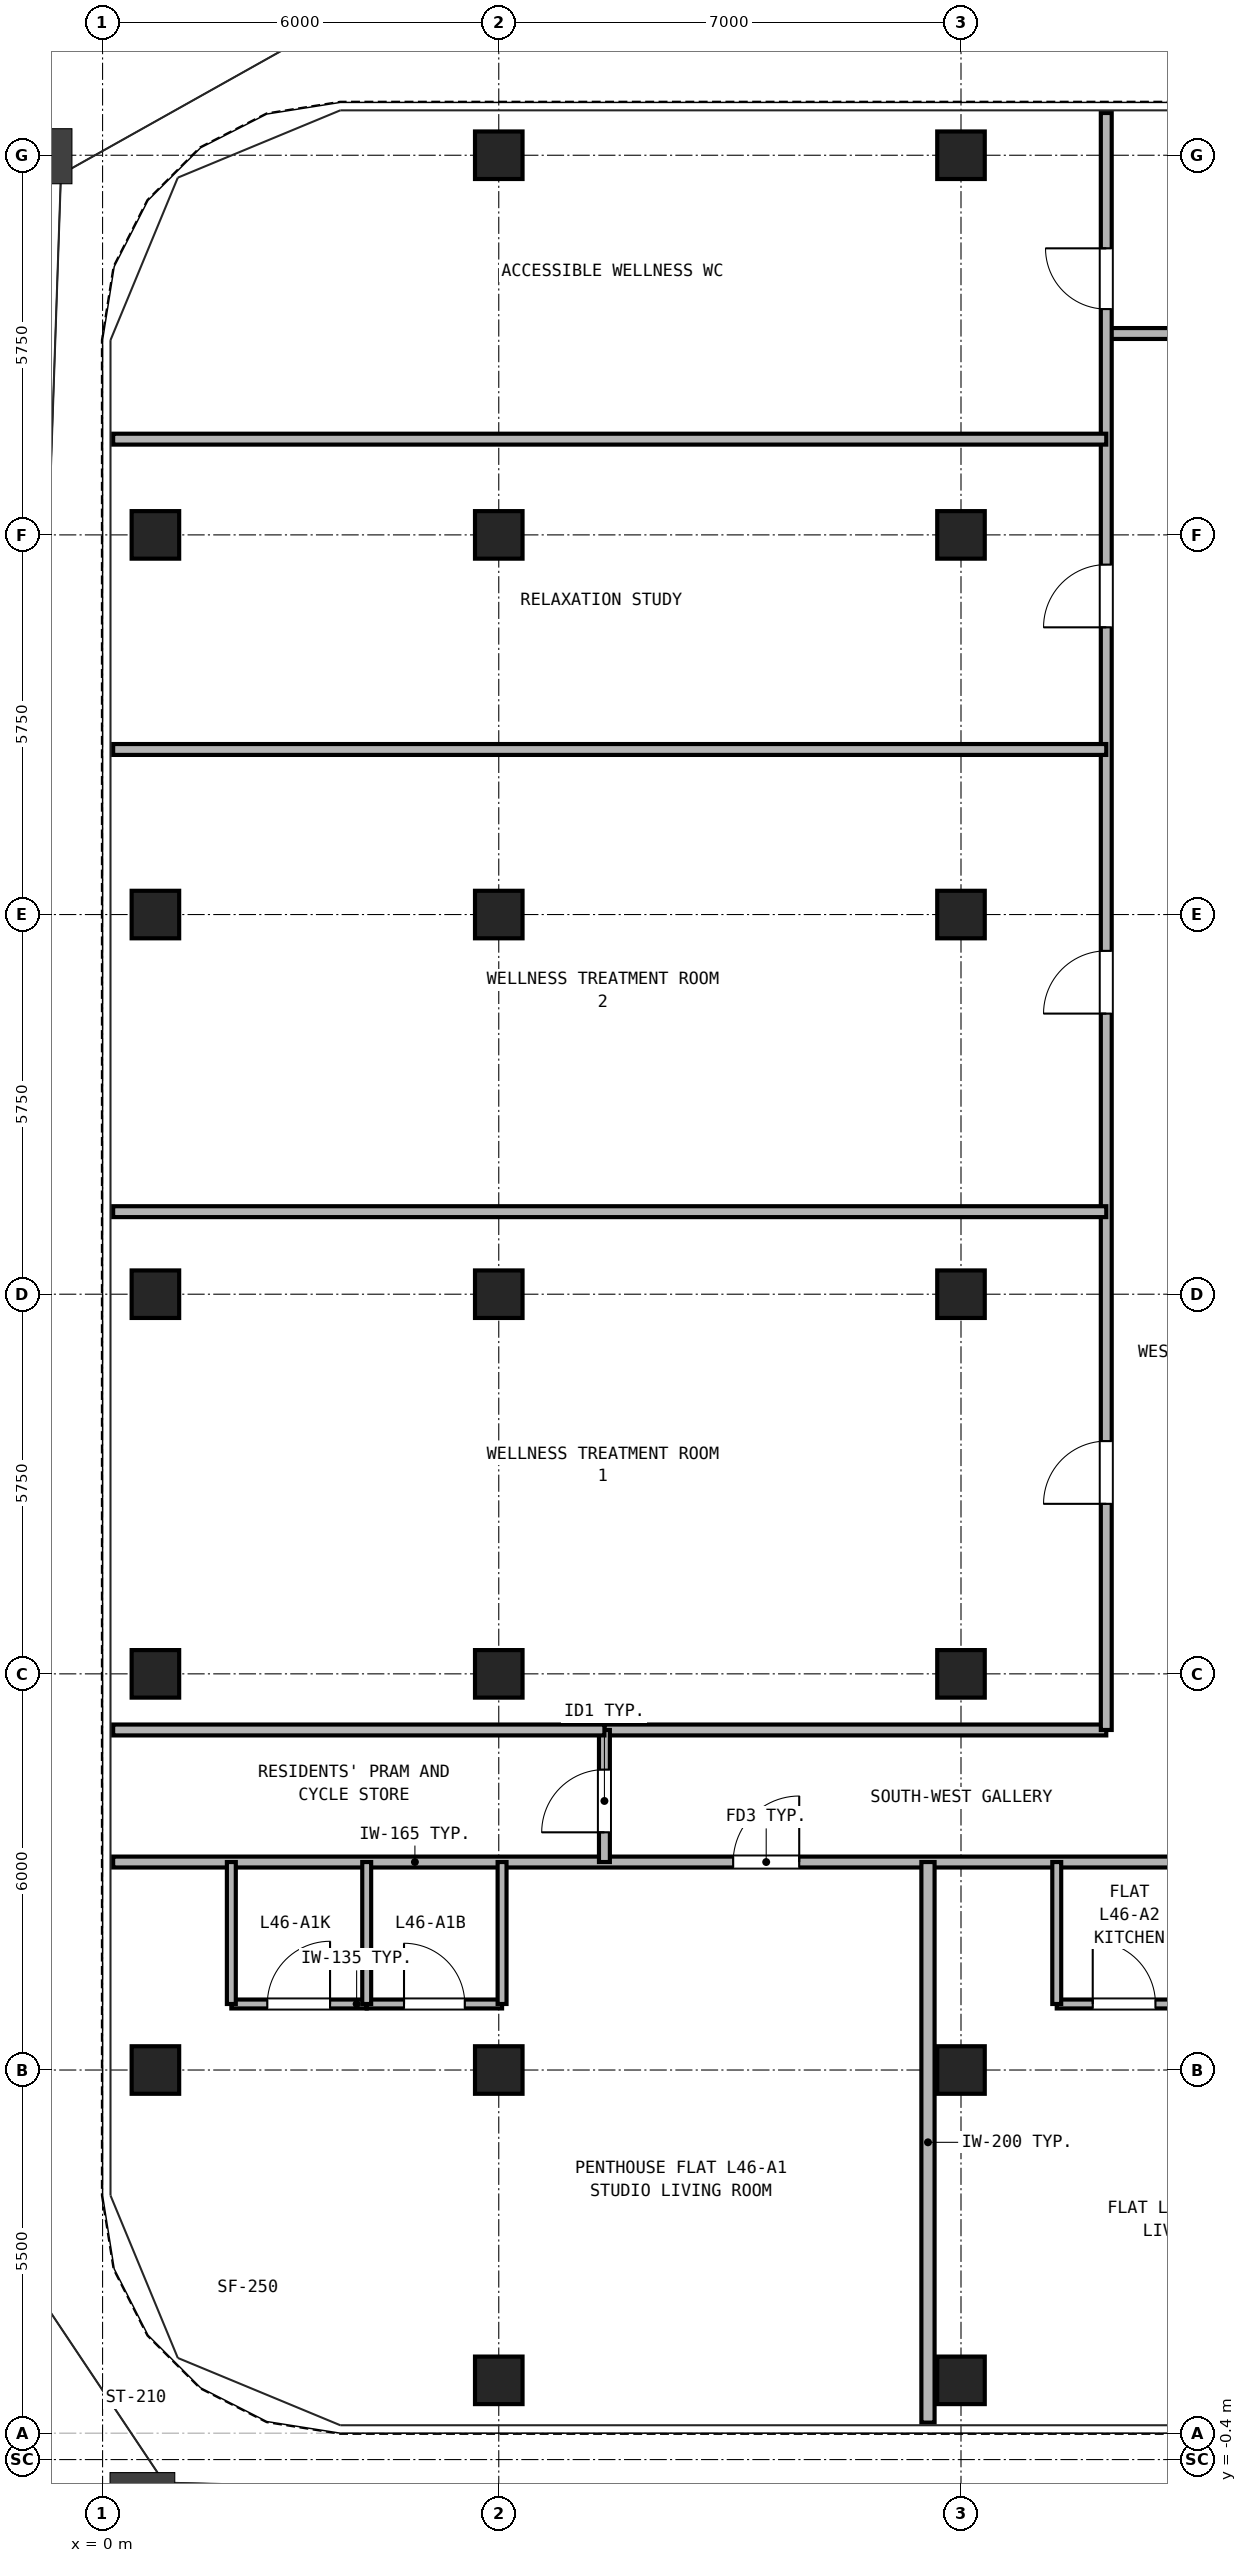
"""IFC4 building model, lengths in metres.
Left out: names, types, materials, properties, quantities, classifications, styles, units other than length and angle.
Written with IfcOpenShell. Run it as: python <this file> out.ifc"""

import sys

from ifc_helpers import new_model, si_unit, direction, frame, frame_2d, origin, origin_2d, place, context, subcontext, project, spatial, rectangle, hollow_rectangle, extrude, source, transform, mapped, element, fill, save


model = new_model("IFC4")
c1 = context("Model", 3, precision=1e-05, world=origin(), true_north=direction((0.0, 1.0)))
c2 = subcontext(c1, "Body", "Model", "MODEL_VIEW")
j1 = project(units=[si_unit("LENGTHUNIT", "METRE"), si_unit("PLANEANGLEUNIT", "RADIAN")], contexts=[c1])
p1 = place(None, origin())
s1 = spatial("IfcSite", under=j1, at=p1, CompositionType="ELEMENT")
p2 = place(p1, origin())
s2 = spatial("IfcBuilding", under=s1, at=p2, CompositionType="ELEMENT")
p3 = place(p2, frame((0.0, 0.0, 165.7)))
s3 = spatial("IfcBuildingStorey", under=s2, at=p3, CompositionType="ELEMENT", Elevation=165.7)
m1 = source(origin(), c2, "Body", "SweptSolid", [
    extrude(hollow_rectangle(XDim=0.72, YDim=0.72, WallThickness=0.04, at=origin_2d()), origin(), (0.0, 0.0, 1.0), 2.95),
])
for number, where, z_axis, x_axis in (
    (1, (6.0, 0.8, 0.0), (0.0, 0.0, 1.0), (1.0, 0.0, 0.0)),
    (2, (6.0, 34.5, 0.0), (0.0, 0.0, 1.0), (1.0, 0.0, 0.0)),
    (3, (13.0, 0.8, 0.0), (0.0, 0.0, 1.0), (1.0, 0.0, 0.0)),
    (4, (13.0, 34.5, 0.0), (0.0, 0.0, 1.0), (1.0, 0.0, 0.0)),
    (5, (0.8, 5.5, 0.0), (0.0, 0.0, 1.0), (1.0, 0.0, 0.0)),
    (6, (0.8, 11.5, 0.0), (0.0, 0.0, 1.0), (1.0, 0.0, 0.0)),
    (7, (0.8, 17.25, 0.0), (0.0, 0.0, 1.0), (1.0, 0.0, 0.0)),
    (8, (0.8, 23.0, 0.0), (0.0, 0.0, 1.0), (1.0, 0.0, 0.0)),
    (9, (0.8, 28.75, 0.0), (0.0, 0.0, 1.0), (1.0, 0.0, 0.0)),
    (10, (6.0, 5.5, 0.0), (0.0, 0.0, 1.0), (1.0, 0.0, 0.0)),
    (11, (6.0, 11.5, 0.0), (0.0, 0.0, 1.0), (1.0, 0.0, 0.0)),
    (12, (6.0, 17.25, 0.0), (0.0, 0.0, 1.0), (1.0, 0.0, 0.0)),
    (13, (6.0, 23.0, 0.0), (0.0, 0.0, 1.0), (1.0, 0.0, 0.0)),
    (14, (6.0, 28.75, 0.0), (0.0, 0.0, 1.0), (1.0, 0.0, 0.0)),
    (15, (13.0, 5.5, 0.0), (0.0, 0.0, 1.0), (1.0, 0.0, 0.0)),
    (16, (13.0, 11.5, 0.0), (0.0, 0.0, 1.0), (1.0, 0.0, 0.0)),
    (17, (13.0, 17.25, 0.0), (0.0, 0.0, 1.0), (1.0, 0.0, 0.0)),
    (18, (13.0, 23.0, 0.0), (0.0, 0.0, 1.0), (1.0, 0.0, 0.0)),
    (19, (13.0, 28.75, 0.0), (0.0, 0.0, 1.0), (1.0, 0.0, 0.0)),
):
    element("IfcColumn", number, at=place(p3, frame(where, z_axis=z_axis, x_axis=x_axis)), inside=s3, PredefinedType="COLUMN", context=c2, shape_type="MappedRepresentation", body=[
        mapped(m1, transform((0.0, 0.0, 0.0), x_axis=(1.0, 0.0, 0.0), y_axis=(0.0, 1.0, 0.0), z_axis=(0.0, 0.0, 1.0), scale=1.0)),
    ])
p4 = place(p3, frame((0.16, 8.65, 0.0), z_axis=(0.0, 0.0, 1.0), x_axis=(1.0, 0.0, 0.0)))
e20 = element("IfcWall", 20, at=p4, inside=s3, PredefinedType="PARTITIONING", context=c2, shape_type="SweptSolid", body=[
    extrude(rectangle(XDim=41.48, YDim=0.165, at=frame_2d((20.74, 0.0))), origin(), (0.0, 0.0, 1.0), 2.583),
])
p5 = place(p4, frame((9.39, 0.0, 0.0)))
e21 = element("IfcOpeningElement", 21, at=p5, cuts=e20, PredefinedType="OPENING", context=c2, shape_type="SweptSolid", body=[
    extrude(rectangle(XDim=1.0, YDim=2.15, at=frame_2d((0.5, 1.075))), frame((0.0, 0.093, 0.0), z_axis=(0.0, -1.0, 0.0), x_axis=(1.0, 0.0, 0.0)), (0.0, 0.0, 1.0), 0.185),
])
p6 = place(p4, frame((18.965, 0.0, 0.0)))
e22 = element("IfcOpeningElement", 22, at=p6, cuts=e20, PredefinedType="OPENING", context=c2, shape_type="SweptSolid", body=[
    extrude(rectangle(XDim=1.0, YDim=2.15, at=frame_2d((0.5, 1.075))), frame((0.0, 0.093, 0.0), z_axis=(0.0, -1.0, 0.0), x_axis=(1.0, 0.0, 0.0)), (0.0, 0.0, 1.0), 0.185),
])
p7 = place(p4, frame((26.34, 0.0, 0.0)))
e23 = element("IfcOpeningElement", 23, at=p7, cuts=e20, PredefinedType="OPENING", context=c2, shape_type="SweptSolid", body=[
    extrude(rectangle(XDim=1.0, YDim=2.15, at=frame_2d((0.5, 1.075))), frame((0.0, 0.093, 0.0), z_axis=(0.0, -1.0, 0.0), x_axis=(1.0, 0.0, 0.0)), (0.0, 0.0, 1.0), 0.185),
])
p8 = place(p4, frame((31.715, 0.0, 0.0)))
e24 = element("IfcOpeningElement", 24, at=p8, cuts=e20, PredefinedType="OPENING", context=c2, shape_type="SweptSolid", body=[
    extrude(rectangle(XDim=1.0, YDim=2.15, at=frame_2d((0.5, 1.075))), frame((0.0, 0.093, 0.0), z_axis=(0.0, -1.0, 0.0), x_axis=(1.0, 0.0, 0.0)), (0.0, 0.0, 1.0), 0.185),
])
p9 = place(p3, frame((7.6, 10.65, 0.0), z_axis=(0.0, 0.0, 1.0), x_axis=(1.0, 0.0, 0.0)))
e25 = element("IfcWall", 25, at=p9, inside=s3, PredefinedType="PARTITIONING", context=c2, shape_type="SweptSolid", body=[
    extrude(rectangle(XDim=7.6, YDim=0.165, at=frame_2d((3.8, 0.0))), origin(), (0.0, 0.0, 1.0), 2.95),
])
p10 = place(p3, frame((7.6, 8.65, 0.0), z_axis=(0.0, 0.0, 1.0), x_axis=(0.0, 1.0, 0.0)))
e26 = element("IfcWall", 26, at=p10, inside=s3, PredefinedType="PARTITIONING", context=c2, shape_type="SweptSolid", body=[
    extrude(rectangle(XDim=2.0, YDim=0.165, at=frame_2d((1.0, 0.0))), origin(), (0.0, 0.0, 1.0), 2.95),
])
p11 = place(p10, frame((0.45, 0.0, 0.0)))
e27 = element("IfcOpeningElement", 27, at=p11, cuts=e26, PredefinedType="OPENING", context=c2, shape_type="SweptSolid", body=[
    extrude(rectangle(XDim=0.95, YDim=2.15, at=frame_2d((0.475, 1.075))), frame((0.0, 0.093, 0.0), z_axis=(0.0, -1.0, 0.0), x_axis=(1.0, 0.0, 0.0)), (0.0, 0.0, 1.0), 0.185),
])
p12 = place(p3, frame((15.2, 31.8, 0.0), z_axis=(0.0, 0.0, 1.0), x_axis=(1.0, 0.0, 0.0)))
e28 = element("IfcWall", 28, at=p12, inside=s3, PredefinedType="PARTITIONING", context=c2, shape_type="SweptSolid", body=[
    extrude(rectangle(XDim=16.6, YDim=0.165, at=frame_2d((8.3, 0.0))), origin(), (0.0, 0.0, 1.0), 2.583),
])
p13 = place(p12, frame((3.65, 0.0, 0.0)))
e29 = element("IfcOpeningElement", 29, at=p13, cuts=e28, PredefinedType="OPENING", context=c2, shape_type="SweptSolid", body=[
    extrude(rectangle(XDim=0.95, YDim=2.15, at=frame_2d((0.475, 1.075))), frame((0.0, 0.093, 0.0), z_axis=(0.0, -1.0, 0.0), x_axis=(1.0, 0.0, 0.0)), (0.0, 0.0, 1.0), 0.185),
])
p14 = place(p12, frame((9.1, 0.0, 0.0)))
e30 = element("IfcOpeningElement", 30, at=p14, cuts=e28, PredefinedType="OPENING", context=c2, shape_type="SweptSolid", body=[
    extrude(rectangle(XDim=0.95, YDim=2.15, at=frame_2d((0.475, 1.075))), frame((0.0, 0.093, 0.0), z_axis=(0.0, -1.0, 0.0), x_axis=(1.0, 0.0, 0.0)), (0.0, 0.0, 1.0), 0.185),
])
p15 = place(p12, frame((13.25, 0.0, 0.0)))
e31 = element("IfcOpeningElement", 31, at=p15, cuts=e28, PredefinedType="OPENING", context=c2, shape_type="SweptSolid", body=[
    extrude(rectangle(XDim=0.92, YDim=2.1, at=frame_2d((0.46, 1.05))), frame((0.0, 0.093, 0.0), z_axis=(0.0, -1.0, 0.0), x_axis=(1.0, 0.0, 0.0)), (0.0, 0.0, 1.0), 0.185),
])
p16 = place(p3, frame((15.2, 10.65, 0.0), z_axis=(0.0, 0.0, 1.0), x_axis=(0.0, 1.0, 0.0)))
e32 = element("IfcWall", 32, at=p16, inside=s3, PredefinedType="PARTITIONING", context=c2, shape_type="SweptSolid", body=[
    extrude(rectangle(XDim=24.49, YDim=0.165, at=frame_2d((12.245, 0.0))), origin(), (0.0, 0.0, 1.0), 2.95),
])
p17 = place(p16, frame((3.425, 0.0, 0.0)))
e33 = element("IfcOpeningElement", 33, at=p17, cuts=e32, PredefinedType="OPENING", context=c2, shape_type="SweptSolid", body=[
    extrude(rectangle(XDim=0.95, YDim=2.15, at=frame_2d((0.475, 1.075))), frame((0.0, 0.093, 0.0), z_axis=(0.0, -1.0, 0.0), x_axis=(1.0, 0.0, 0.0)), (0.0, 0.0, 1.0), 0.185),
])
p18 = place(p16, frame((10.85, 0.0, 0.0)))
e34 = element("IfcOpeningElement", 34, at=p18, cuts=e32, PredefinedType="OPENING", context=c2, shape_type="SweptSolid", body=[
    extrude(rectangle(XDim=0.95, YDim=2.15, at=frame_2d((0.475, 1.075))), frame((0.0, 0.093, 0.0), z_axis=(0.0, -1.0, 0.0), x_axis=(1.0, 0.0, 0.0)), (0.0, 0.0, 1.0), 0.185),
])
p19 = place(p16, frame((16.7, 0.0, 0.0)))
e35 = element("IfcOpeningElement", 35, at=p19, cuts=e32, PredefinedType="OPENING", context=c2, shape_type="SweptSolid", body=[
    extrude(rectangle(XDim=0.95, YDim=2.15, at=frame_2d((0.475, 1.075))), frame((0.0, 0.093, 0.0), z_axis=(0.0, -1.0, 0.0), x_axis=(1.0, 0.0, 0.0)), (0.0, 0.0, 1.0), 0.185),
])
p20 = place(p16, frame((21.52, 0.0, 0.0)))
e36 = element("IfcOpeningElement", 36, at=p20, cuts=e32, PredefinedType="OPENING", context=c2, shape_type="SweptSolid", body=[
    extrude(rectangle(XDim=0.92, YDim=2.1, at=frame_2d((0.46, 1.05))), frame((0.0, 0.093, 0.0), z_axis=(0.0, -1.0, 0.0), x_axis=(1.0, 0.0, 0.0)), (0.0, 0.0, 1.0), 0.185),
])
p21 = place(p3, frame((1.95, 6.5, 0.0), z_axis=(0.0, 0.0, 1.0), x_axis=(1.0, 0.0, 0.0)))
e37 = element("IfcWall", 37, at=p21, inside=s3, PredefinedType="PARTITIONING", context=c2, shape_type="SweptSolid", body=[
    extrude(rectangle(XDim=2.05, YDim=0.135, at=frame_2d((1.025, 0.0))), origin(), (0.0, 0.0, 1.0), 2.95),
])
p22 = place(p21, frame((0.545, 0.0, 0.0)))
e38 = element("IfcOpeningElement", 38, at=p22, cuts=e37, PredefinedType="OPENING", context=c2, shape_type="SweptSolid", body=[
    extrude(rectangle(XDim=0.95, YDim=2.15, at=frame_2d((0.475, 1.075))), frame((0.0, 0.077, 0.0), z_axis=(0.0, -1.0, 0.0), x_axis=(1.0, 0.0, 0.0)), (0.0, 0.0, 1.0), 0.155),
])
p23 = place(p3, frame((4.0, 6.5, 0.0), z_axis=(0.0, 0.0, 1.0), x_axis=(1.0, 0.0, 0.0)))
e39 = element("IfcWall", 39, at=p23, inside=s3, PredefinedType="PARTITIONING", context=c2, shape_type="SweptSolid", body=[
    extrude(rectangle(XDim=2.05, YDim=0.135, at=frame_2d((1.025, 0.0))), origin(), (0.0, 0.0, 1.0), 2.95),
])
p24 = place(p23, frame((0.565, 0.0, 0.0)))
e40 = element("IfcOpeningElement", 40, at=p24, cuts=e39, PredefinedType="OPENING", context=c2, shape_type="SweptSolid", body=[
    extrude(rectangle(XDim=0.92, YDim=2.1, at=frame_2d((0.46, 1.05))), frame((0.0, 0.077, 0.0), z_axis=(0.0, -1.0, 0.0), x_axis=(1.0, 0.0, 0.0)), (0.0, 0.0, 1.0), 0.155),
])
for number, where, z_axis, x_axis in (
    (41, (1.95, 6.5, 0.0), (0.0, 0.0, 1.0), (0.0, 1.0, 0.0)),
    (42, (4.0, 6.5, 0.0), (0.0, 0.0, 1.0), (0.0, 1.0, 0.0)),
):
    element("IfcWall", number, at=place(p3, frame(where, z_axis=z_axis, x_axis=x_axis)), inside=s3, PredefinedType="PARTITIONING", context=c2, shape_type="SweptSolid", body=[
        extrude(rectangle(XDim=2.15, YDim=0.135, at=frame_2d((1.075, 0.0))), origin(), (0.0, 0.0, 1.0), 2.95),
    ])
p25 = place(p3, frame((6.05, 6.5, 0.0), z_axis=(0.0, 0.0, 1.0), x_axis=(0.0, 1.0, 0.0)))
e43 = element("IfcWall", 43, at=p25, inside=s3, PredefinedType="PARTITIONING", context=c2, shape_type="SweptSolid", body=[
    extrude(rectangle(XDim=2.15, YDim=0.135, at=frame_2d((1.075, 0.0))), origin(), (0.0, 0.0, 1.0), 2.323),
])
p26 = place(p3, frame((12.5, 0.16, 0.0), z_axis=(0.0, 0.0, 1.0), x_axis=(0.0, 1.0, 0.0)))
e44 = element("IfcWall", 44, at=p26, inside=s3, PredefinedType="PARTITIONING", context=c2, shape_type="SweptSolid", body=[
    extrude(rectangle(XDim=8.49, YDim=0.2, at=frame_2d((4.245, 0.0))), origin(), (0.0, 0.0, 1.0), 2.95),
])
p27 = place(p3, frame((14.45, 6.5, 0.0), z_axis=(0.0, 0.0, 1.0), x_axis=(1.0, 0.0, 0.0)))
e45 = element("IfcWall", 45, at=p27, inside=s3, PredefinedType="PARTITIONING", context=c2, shape_type="SweptSolid", body=[
    extrude(rectangle(XDim=2.05, YDim=0.135, at=frame_2d((1.025, 0.0))), origin(), (0.0, 0.0, 1.0), 2.95),
])
p28 = place(p27, frame((0.545, 0.0, 0.0)))
e46 = element("IfcOpeningElement", 46, at=p28, cuts=e45, PredefinedType="OPENING", context=c2, shape_type="SweptSolid", body=[
    extrude(rectangle(XDim=0.95, YDim=2.15, at=frame_2d((0.475, 1.075))), frame((0.0, 0.077, 0.0), z_axis=(0.0, -1.0, 0.0), x_axis=(1.0, 0.0, 0.0)), (0.0, 0.0, 1.0), 0.155),
])
p29 = place(p3, frame((14.45, 6.5, 0.0), z_axis=(0.0, 0.0, 1.0), x_axis=(0.0, 1.0, 0.0)))
e47 = element("IfcWall", 47, at=p29, inside=s3, PredefinedType="PARTITIONING", context=c2, shape_type="SweptSolid", body=[
    extrude(rectangle(XDim=2.15, YDim=0.135, at=frame_2d((1.075, 0.0))), origin(), (0.0, 0.0, 1.0), 2.95),
])
p30 = place(p3, frame((0.16, 10.65, 0.0), z_axis=(0.0, 0.0, 1.0), x_axis=(1.0, 0.0, 0.0)))
e48 = element("IfcWall", 48, at=p30, inside=s3, PredefinedType="PARTITIONING", context=c2, shape_type="SweptSolid", body=[
    extrude(rectangle(XDim=7.44, YDim=0.165, at=frame_2d((3.72, 0.0))), origin(), (0.0, 0.0, 1.0), 2.95),
])
for number, where, z_axis, x_axis in (
    (49, (0.16, 18.5, 0.0), (0.0, 0.0, 1.0), (1.0, 0.0, 0.0)),
    (50, (0.16, 25.5, 0.0), (0.0, 0.0, 1.0), (1.0, 0.0, 0.0)),
    (51, (0.16, 30.2, 0.0), (0.0, 0.0, 1.0), (1.0, 0.0, 0.0)),
):
    element("IfcWall", number, at=place(p3, frame(where, z_axis=z_axis, x_axis=x_axis)), inside=s3, PredefinedType="PARTITIONING", context=c2, shape_type="SweptSolid", body=[
        extrude(rectangle(XDim=15.04, YDim=0.165, at=frame_2d((7.52, 0.0))), origin(), (0.0, 0.0, 1.0), 2.95),
    ])
p31 = place(p22, origin())
e52 = element("IfcDoor", 52, at=p31, inside=s3, OperationType="SINGLE_SWING_RIGHT", PredefinedType="DOOR", context=c2, shape_type="SweptSolid", body=[
    extrude(rectangle(XDim=0.95, YDim=2.15, at=frame_2d((0.475, 1.075))), frame((0.0, 0.025, 0.0), z_axis=(0.0, -1.0, 0.0), x_axis=(1.0, 0.0, 0.0)), (0.0, 0.0, 1.0), 0.05),
])
fill(e38, e52)
p32 = place(p24, origin())
e53 = element("IfcDoor", 53, at=p32, inside=s3, OperationType="SINGLE_SWING_LEFT", PredefinedType="DOOR", context=c2, shape_type="SweptSolid", body=[
    extrude(rectangle(XDim=0.92, YDim=2.1, at=frame_2d((0.46, 1.05))), frame((0.0, 0.025, 0.0), z_axis=(0.0, -1.0, 0.0), x_axis=(1.0, 0.0, 0.0)), (0.0, 0.0, 1.0), 0.05),
])
fill(e40, e53)
p33 = place(p5, frame((1.0, 0.0, 0.0), z_axis=(0.0, 0.0, 1.0), x_axis=(-1.0, 0.0, 0.0)))
e54 = element("IfcDoor", 54, at=p33, inside=s3, OperationType="SINGLE_SWING_RIGHT", PredefinedType="DOOR", context=c2, shape_type="SweptSolid", body=[
    extrude(rectangle(XDim=1.0, YDim=2.15, at=frame_2d((0.5, 1.075))), frame((0.0, 0.025, 0.0), z_axis=(0.0, -1.0, 0.0), x_axis=(1.0, 0.0, 0.0)), (0.0, 0.0, 1.0), 0.05),
])
fill(e21, e54)
p34 = place(p28, origin())
e55 = element("IfcDoor", 55, at=p34, inside=s3, OperationType="SINGLE_SWING_LEFT", PredefinedType="DOOR", context=c2, shape_type="SweptSolid", body=[
    extrude(rectangle(XDim=0.95, YDim=2.15, at=frame_2d((0.475, 1.075))), frame((0.0, 0.025, 0.0), z_axis=(0.0, -1.0, 0.0), x_axis=(1.0, 0.0, 0.0)), (0.0, 0.0, 1.0), 0.05),
])
fill(e46, e55)
p35 = place(p11, frame((0.95, 0.0, 0.0), z_axis=(0.0, 0.0, 1.0), x_axis=(-1.0, 0.0, 0.0)))
e56 = element("IfcDoor", 56, at=p35, inside=s3, OperationType="SINGLE_SWING_LEFT", PredefinedType="DOOR", context=c2, shape_type="SweptSolid", body=[
    extrude(rectangle(XDim=0.95, YDim=2.15, at=frame_2d((0.475, 1.075))), frame((0.0, 0.025, 0.0), z_axis=(0.0, -1.0, 0.0), x_axis=(1.0, 0.0, 0.0)), (0.0, 0.0, 1.0), 0.05),
])
fill(e27, e56)
p36 = place(p17, frame((0.95, 0.0, 0.0), z_axis=(0.0, 0.0, 1.0), x_axis=(-1.0, 0.0, 0.0)))
e57 = element("IfcDoor", 57, at=p36, inside=s3, OperationType="SINGLE_SWING_LEFT", PredefinedType="DOOR", context=c2, shape_type="SweptSolid", body=[
    extrude(rectangle(XDim=0.95, YDim=2.15, at=frame_2d((0.475, 1.075))), frame((0.0, 0.025, 0.0), z_axis=(0.0, -1.0, 0.0), x_axis=(1.0, 0.0, 0.0)), (0.0, 0.0, 1.0), 0.05),
])
fill(e33, e57)
p37 = place(p18, frame((0.95, 0.0, 0.0), z_axis=(0.0, 0.0, 1.0), x_axis=(-1.0, 0.0, 0.0)))
e58 = element("IfcDoor", 58, at=p37, inside=s3, OperationType="SINGLE_SWING_LEFT", PredefinedType="DOOR", context=c2, shape_type="SweptSolid", body=[
    extrude(rectangle(XDim=0.95, YDim=2.15, at=frame_2d((0.475, 1.075))), frame((0.0, 0.025, 0.0), z_axis=(0.0, -1.0, 0.0), x_axis=(1.0, 0.0, 0.0)), (0.0, 0.0, 1.0), 0.05),
])
fill(e34, e58)
p38 = place(p19, frame((0.95, 0.0, 0.0), z_axis=(0.0, 0.0, 1.0), x_axis=(-1.0, 0.0, 0.0)))
e59 = element("IfcDoor", 59, at=p38, inside=s3, OperationType="SINGLE_SWING_LEFT", PredefinedType="DOOR", context=c2, shape_type="SweptSolid", body=[
    extrude(rectangle(XDim=0.95, YDim=2.15, at=frame_2d((0.475, 1.075))), frame((0.0, 0.025, 0.0), z_axis=(0.0, -1.0, 0.0), x_axis=(1.0, 0.0, 0.0)), (0.0, 0.0, 1.0), 0.05),
])
fill(e35, e59)
p39 = place(p20, frame((0.92, 0.0, 0.0), z_axis=(0.0, 0.0, 1.0), x_axis=(-1.0, 0.0, 0.0)))
e60 = element("IfcDoor", 60, at=p39, inside=s3, OperationType="SINGLE_SWING_RIGHT", PredefinedType="DOOR", context=c2, shape_type="SweptSolid", body=[
    extrude(rectangle(XDim=0.92, YDim=2.1, at=frame_2d((0.46, 1.05))), frame((0.0, 0.025, 0.0), z_axis=(0.0, -1.0, 0.0), x_axis=(1.0, 0.0, 0.0)), (0.0, 0.0, 1.0), 0.05),
])
fill(e36, e60)
save(model, sys.argv[1])
